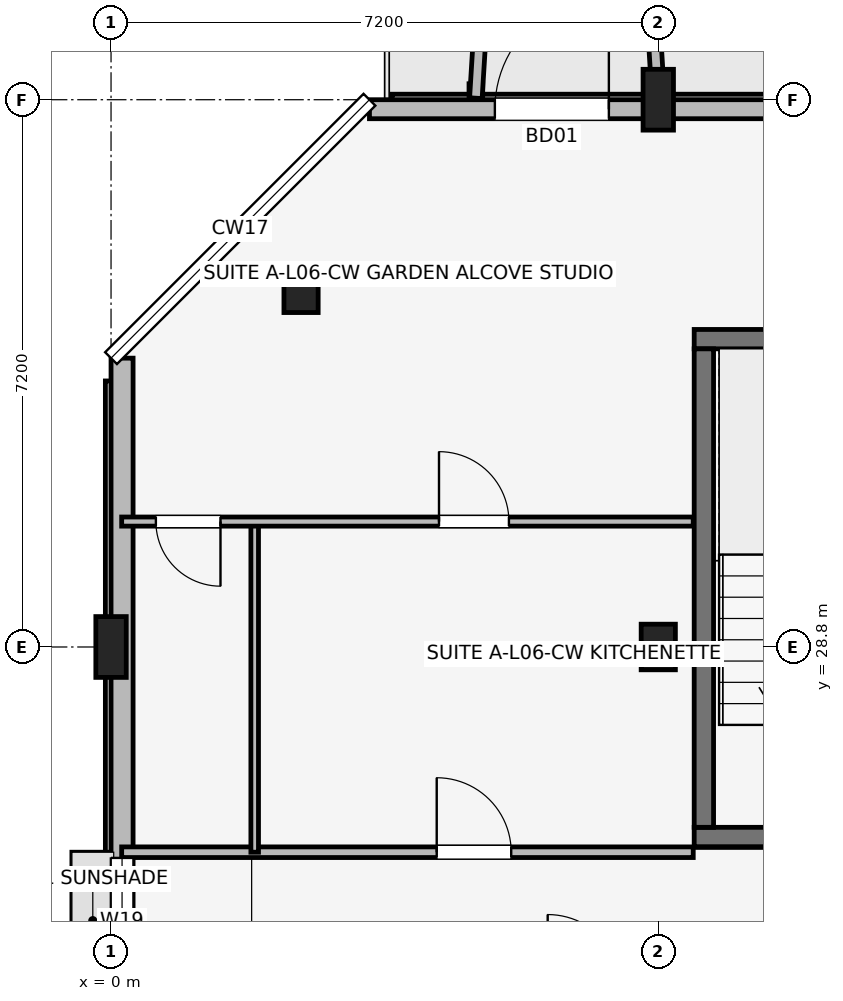
"""IFC4 building model, lengths in metres.
Left out: names, types, materials, properties, quantities, classifications, styles, units other than length and angle.
Written with IfcOpenShell. Run it as: python <this file> out.ifc"""

import sys

from ifc_helpers import new_model, si_unit, direction, frame, frame_2d, origin, origin_2d, place, context, subcontext, project, spatial, rectangle, extrude, element, fill, save


model = new_model("IFC4")
c1 = context("Model", 3, precision=1e-05, world=origin(), true_north=direction((0.0, 1.0)))
c2 = subcontext(c1, "Body", "Model", "MODEL_VIEW")
j1 = project(units=[si_unit("LENGTHUNIT", "METRE"), si_unit("PLANEANGLEUNIT", "RADIAN")], contexts=[c1])
p1 = place(None, origin())
s1 = spatial("IfcSite", under=j1, at=p1, CompositionType="ELEMENT")
p2 = place(p1, origin())
s2 = spatial("IfcBuilding", under=s1, at=p2, CompositionType="ELEMENT")
p3 = place(p2, frame((0.0, 0.0, 21.3)))
s3 = spatial("IfcBuildingStorey", under=s2, at=p3, CompositionType="ELEMENT", Elevation=21.3)
p4 = place(p3, frame((0.0, 28.8, 0.0), z_axis=(0.0, 0.0, 1.0), x_axis=(1.0, 0.0, 0.0)))
e1 = element("IfcColumn", 1, at=p4, inside=s3, PredefinedType="COLUMN", context=c2, shape_type="SweptSolid", body=[
    extrude(rectangle(XDim=0.4, YDim=0.8, at=origin_2d()), origin(), (0.0, 0.0, 1.0), 3.15),
])
for number, where, z_axis, x_axis in (
    (2, (2.5, 33.5, 0.0), (0.0, 0.0, 1.0), (1.0, 0.0, 0.0)),
    (3, (7.2, 28.8, 0.0), (0.0, 0.0, 1.0), (1.0, 0.0, 0.0)),
):
    element("IfcColumn", number, at=place(p3, frame(where, z_axis=z_axis, x_axis=x_axis)), inside=s3, PredefinedType="COLUMN", context=c2, shape_type="SweptSolid", body=[
        extrude(rectangle(XDim=0.45, YDim=0.6, at=origin_2d()), origin(), (0.0, 0.0, 1.0), 3.15),
    ])
p5 = place(p3, frame((7.2, 36.0, 0.0), z_axis=(0.0, 0.0, 1.0), x_axis=(1.0, 0.0, 0.0)))
e4 = element("IfcColumn", 4, at=p5, inside=s3, PredefinedType="COLUMN", context=c2, shape_type="SweptSolid", body=[
    extrude(rectangle(XDim=0.4, YDim=0.8, at=origin_2d()), origin(), (0.0, 0.0, 1.0), 3.15),
])
p6 = place(p3, frame((7.673, 26.3, 0.0), z_axis=(0.0, 0.0, 1.0), x_axis=(1.0, 0.0, 0.0)))
e5 = element("IfcWall", 5, at=p6, inside=s3, PredefinedType="SHEAR", context=c2, shape_type="SweptSolid", body=[
    extrude(rectangle(XDim=3.305, YDim=0.255, at=frame_2d((1.652, 0.0))), origin(), (0.0, 0.0, 1.0), 3.15),
])
p7 = place(p6, frame((2.177, 0.0, 0.0), z_axis=(0.0, 0.0, 1.0), x_axis=(-1.0, 0.0, 0.0)))
e6 = element("IfcOpeningElement", 6, at=p7, cuts=e5, PredefinedType="OPENING", context=c2, shape_type="SweptSolid", body=[
    extrude(rectangle(XDim=1.05, YDim=2.12, at=frame_2d((0.525, 1.06))), frame((0.0, 0.137, 0.0), z_axis=(0.0, -1.0, 0.0), x_axis=(1.0, 0.0, 0.0)), (0.0, 0.0, 1.0), 0.275),
])
p8 = place(p3, frame((7.673, 32.85, 0.0), z_axis=(0.0, 0.0, 1.0), x_axis=(1.0, 0.0, 0.0)))
e7 = element("IfcWall", 7, at=p8, inside=s3, PredefinedType="SHEAR", context=c2, shape_type="SweptSolid", body=[
    extrude(rectangle(XDim=3.305, YDim=0.255, at=frame_2d((1.652, 0.0))), origin(), (0.0, 0.0, 1.0), 3.15),
])
p9 = place(p3, frame((7.8, 26.427, 0.0), z_axis=(0.0, 0.0, 1.0), x_axis=(0.0, 1.0, 0.0)))
e8 = element("IfcWall", 8, at=p9, inside=s3, PredefinedType="SHEAR", context=c2, shape_type="SweptSolid", body=[
    extrude(rectangle(XDim=6.295, YDim=0.255, at=frame_2d((3.147, 0.0))), origin(), (0.0, 0.0, 1.0), 3.15),
])
p10 = place(p3, frame((32.6, 35.875, 0.0), z_axis=(0.0, 0.0, 1.0), x_axis=(-1.0, 0.0, 0.0)))
e9 = element("IfcWall", 9, at=p10, inside=s3, PredefinedType="SOLIDWALL", context=c2, shape_type="SweptSolid", body=[
    extrude(rectangle(XDim=29.2, YDim=0.25, at=frame_2d((14.6, 0.0))), origin(), (0.0, 0.0, 1.0), 2.43),
])
p11 = place(p10, frame((27.55, 0.0, 0.0), z_axis=(0.0, 0.0, 1.0), x_axis=(-1.0, 0.0, 0.0)))
e10 = element("IfcOpeningElement", 10, at=p11, cuts=e9, PredefinedType="OPENING", context=c2, shape_type="SweptSolid", body=[
    extrude(rectangle(XDim=1.5, YDim=2.15, at=frame_2d((0.75, 1.075))), frame((0.0, 0.135, 0.0), z_axis=(0.0, -1.0, 0.0), x_axis=(1.0, 0.0, 0.0)), (0.0, 0.0, 1.0), 0.27),
])
p12 = place(p10, frame((3.15, 0.0, 0.0), z_axis=(0.0, 0.0, 1.0), x_axis=(-1.0, 0.0, 0.0)))
e11 = element("IfcOpeningElement", 11, at=p12, cuts=e9, PredefinedType="OPENING", context=c2, shape_type="SweptSolid", body=[
    extrude(rectangle(XDim=1.5, YDim=2.15, at=frame_2d((0.75, 1.075))), frame((0.0, 0.135, 0.0), z_axis=(0.0, -1.0, 0.0), x_axis=(1.0, 0.0, 0.0)), (0.0, 0.0, 1.0), 0.27),
])
p13 = place(p10, frame((14.225, 0.0, 0.5)))
e12 = element("IfcOpeningElement", 12, at=p13, cuts=e9, PredefinedType="OPENING", context=c2, shape_type="SweptSolid", body=[
    extrude(rectangle(XDim=0.75, YDim=1.75, at=frame_2d((0.375, 0.875))), frame((0.0, 0.135, 0.0), z_axis=(0.0, -1.0, 0.0), x_axis=(1.0, 0.0, 0.0)), (0.0, 0.0, 1.0), 0.27),
])
p14 = place(p10, frame((8.82, 0.0, 0.7)))
e13 = element("IfcOpeningElement", 13, at=p14, cuts=e9, PredefinedType="OPENING", context=c2, shape_type="SweptSolid", body=[
    extrude(rectangle(XDim=1.72, YDim=1.6, at=frame_2d((0.86, 0.8))), frame((0.0, 0.135, 0.0), z_axis=(0.0, -1.0, 0.0), x_axis=(1.0, 0.0, 0.0)), (0.0, 0.0, 1.0), 0.27),
])
p15 = place(p10, frame((18.59, 0.0, 0.7)))
e14 = element("IfcOpeningElement", 14, at=p15, cuts=e9, PredefinedType="OPENING", context=c2, shape_type="SweptSolid", body=[
    extrude(rectangle(XDim=1.86, YDim=1.6, at=frame_2d((0.93, 0.8))), frame((0.0, 0.135, 0.0), z_axis=(0.0, -1.0, 0.0), x_axis=(1.0, 0.0, 0.0)), (0.0, 0.0, 1.0), 0.27),
])
p16 = place(p3, frame((0.145, 32.6, 0.0), z_axis=(0.0, 0.0, 1.0), x_axis=(0.0, -1.0, 0.0)))
e15 = element("IfcWall", 15, at=p16, inside=s3, PredefinedType="SOLIDWALL", context=c2, shape_type="SweptSolid", body=[
    extrude(rectangle(XDim=14.8, YDim=0.29, at=frame_2d((7.4, 0.0))), origin(), (0.0, 0.0, 1.0), 2.43),
])
p17 = place(p16, frame((6.575, 0.0, 1.05)))
e16 = element("IfcOpeningElement", 16, at=p17, cuts=e15, PredefinedType="OPENING", context=c2, shape_type="SweptSolid", body=[
    extrude(rectangle(XDim=1.65, YDim=1.15, at=frame_2d((0.825, 0.575))), frame((0.0, 0.155, 0.0), z_axis=(0.0, -1.0, 0.0), x_axis=(1.0, 0.0, 0.0)), (0.0, 0.0, 1.0), 0.31),
])
p18 = place(p16, frame((12.385, 0.0, 0.75)))
e17 = element("IfcOpeningElement", 17, at=p18, cuts=e15, PredefinedType="OPENING", context=c2, shape_type="SweptSolid", body=[
    extrude(rectangle(XDim=1.3, YDim=1.55, at=frame_2d((0.65, 0.775))), frame((0.0, 0.155, 0.0), z_axis=(0.0, -1.0, 0.0), x_axis=(1.0, 0.0, 0.0)), (0.0, 0.0, 1.0), 0.31),
])
for number, where, z_axis, x_axis in (
    (18, (4.8, 36.02, 0.0), (0.0, 0.0, 1.0), (0.061, 0.998, 0.0)),
    (19, (7.2, 36.02, 0.0), (0.0, 0.0, 1.0), (-0.061, 0.998, 0.0)),
):
    element("IfcWall", number, at=place(p3, frame(where, z_axis=z_axis, x_axis=x_axis)), inside=s3, PredefinedType="ELEMENTEDWALL", context=c2, shape_type="SweptSolid", body=[
        extrude(rectangle(XDim=1.964, YDim=0.165, at=frame_2d((0.982, 0.0))), origin(), (0.0, 0.0, 1.0), 2.95),
    ])
p19 = place(p3, frame((0.14, 26.1, 0.0), z_axis=(0.0, 0.0, 1.0), x_axis=(1.0, 0.0, 0.0)))
e20 = element("IfcWall", 20, at=p19, inside=s3, PredefinedType="PARTITIONING", context=c2, shape_type="SweptSolid", body=[
    extrude(rectangle(XDim=7.52, YDim=0.14, at=frame_2d((3.76, 0.0))), origin(), (0.0, 0.0, 1.0), 2.38),
])
p20 = place(p19, frame((4.145, 0.0, 0.0)))
e21 = element("IfcOpeningElement", 21, at=p20, cuts=e20, PredefinedType="OPENING", context=c2, shape_type="SweptSolid", body=[
    extrude(rectangle(XDim=0.98, YDim=2.1, at=frame_2d((0.49, 1.05))), frame((0.0, 0.08, 0.0), z_axis=(0.0, -1.0, 0.0), x_axis=(1.0, 0.0, 0.0)), (0.0, 0.0, 1.0), 0.16),
])
p21 = place(p3, frame((1.89, 26.1, 0.0), z_axis=(0.0, 0.0, 1.0), x_axis=(0.0, 1.0, 0.0)))
e22 = element("IfcWall", 22, at=p21, inside=s3, PredefinedType="PARTITIONING", context=c2, shape_type="SweptSolid", body=[
    extrude(rectangle(XDim=4.35, YDim=0.1, at=frame_2d((2.175, 0.0))), origin(), (0.0, 0.0, 1.0), 2.38),
])
p22 = place(p3, frame((0.14, 30.45, 0.0), z_axis=(0.0, 0.0, 1.0), x_axis=(1.0, 0.0, 0.0)))
e23 = element("IfcWall", 23, at=p22, inside=s3, PredefinedType="PARTITIONING", context=c2, shape_type="SweptSolid", body=[
    extrude(rectangle(XDim=7.52, YDim=0.12, at=frame_2d((3.76, 0.0))), origin(), (0.0, 0.0, 1.0), 2.38),
])
p23 = place(p22, frame((1.3, 0.0, 0.0), z_axis=(0.0, 0.0, 1.0), x_axis=(-1.0, 0.0, 0.0)))
e24 = element("IfcOpeningElement", 24, at=p23, cuts=e23, PredefinedType="OPENING", context=c2, shape_type="SweptSolid", body=[
    extrude(rectangle(XDim=0.85, YDim=2.08, at=frame_2d((0.425, 1.04))), frame((0.0, 0.07, 0.0), z_axis=(0.0, -1.0, 0.0), x_axis=(1.0, 0.0, 0.0)), (0.0, 0.0, 1.0), 0.14),
])
p24 = place(p22, frame((4.175, 0.0, 0.0)))
e25 = element("IfcOpeningElement", 25, at=p24, cuts=e23, PredefinedType="OPENING", context=c2, shape_type="SweptSolid", body=[
    extrude(rectangle(XDim=0.92, YDim=2.08, at=frame_2d((0.46, 1.04))), frame((0.0, 0.07, 0.0), z_axis=(0.0, -1.0, 0.0), x_axis=(1.0, 0.0, 0.0)), (0.0, 0.0, 1.0), 0.14),
])
p25 = place(p11, origin())
e26 = element("IfcDoor", 26, at=p25, inside=s3, OperationType="SINGLE_SWING_LEFT", PredefinedType="DOOR", context=c2, shape_type="SweptSolid", body=[
    extrude(rectangle(XDim=1.5, YDim=2.15, at=frame_2d((0.75, 1.075))), frame((0.0, 0.025, 0.0), z_axis=(0.0, -1.0, 0.0), x_axis=(1.0, 0.0, 0.0)), (0.0, 0.0, 1.0), 0.05),
])
fill(e10, e26)
p26 = place(p17, origin())
e27 = element("IfcWindow", 27, at=p26, inside=s3, PartitioningType="SINGLE_PANEL", PredefinedType="WINDOW", context=c2, shape_type="SweptSolid", body=[
    extrude(rectangle(XDim=1.65, YDim=1.15, at=frame_2d((0.825, 0.575))), frame((0.0, 0.03, 0.0), z_axis=(0.0, -1.0, 0.0), x_axis=(1.0, 0.0, 0.0)), (0.0, 0.0, 1.0), 0.06),
])
fill(e16, e27)
p27 = place(p20, origin())
e28 = element("IfcDoor", 28, at=p27, inside=s3, OperationType="SINGLE_SWING_LEFT", PredefinedType="DOOR", context=c2, shape_type="SweptSolid", body=[
    extrude(rectangle(XDim=0.98, YDim=2.1, at=frame_2d((0.49, 1.05))), frame((0.0, 0.025, 0.0), z_axis=(0.0, -1.0, 0.0), x_axis=(1.0, 0.0, 0.0)), (0.0, 0.0, 1.0), 0.05),
])
fill(e21, e28)
p28 = place(p23, origin())
e29 = element("IfcDoor", 29, at=p28, inside=s3, OperationType="SINGLE_SWING_RIGHT", PredefinedType="DOOR", context=c2, shape_type="SweptSolid", body=[
    extrude(rectangle(XDim=0.85, YDim=2.08, at=frame_2d((0.425, 1.04))), frame((0.0, 0.025, 0.0), z_axis=(0.0, -1.0, 0.0), x_axis=(1.0, 0.0, 0.0)), (0.0, 0.0, 1.0), 0.05),
])
fill(e24, e29)
p29 = place(p24, origin())
e30 = element("IfcDoor", 30, at=p29, inside=s3, OperationType="SINGLE_SWING_LEFT", PredefinedType="DOOR", context=c2, shape_type="SweptSolid", body=[
    extrude(rectangle(XDim=0.92, YDim=2.08, at=frame_2d((0.46, 1.04))), frame((0.0, 0.025, 0.0), z_axis=(0.0, -1.0, 0.0), x_axis=(1.0, 0.0, 0.0)), (0.0, 0.0, 1.0), 0.05),
])
fill(e25, e30)
save(model, sys.argv[1])
